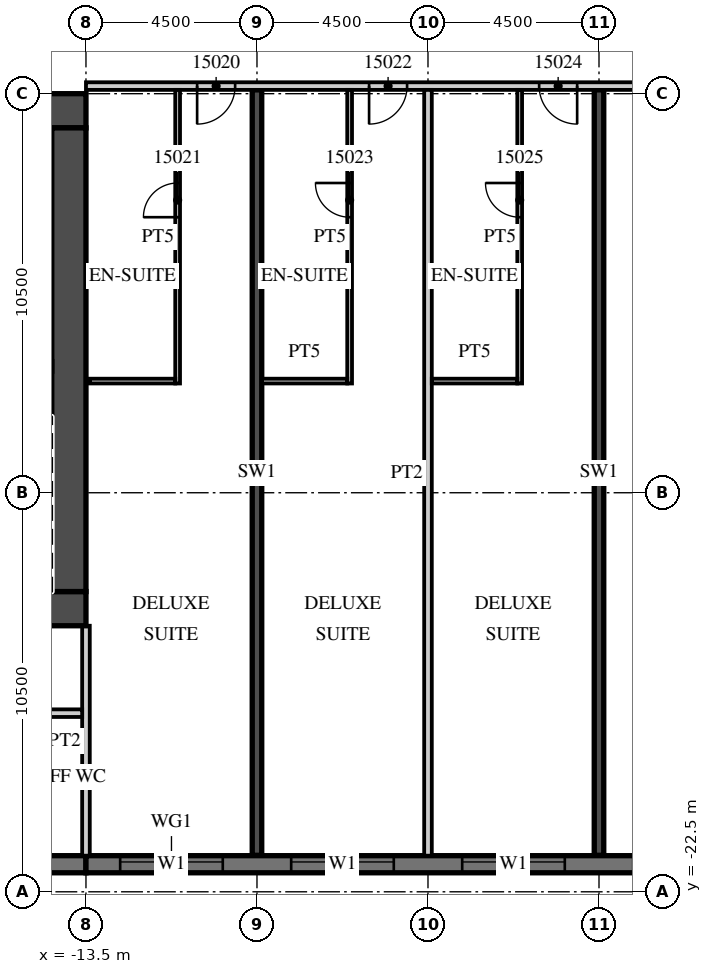
"""IFC4 building model, lengths in metres.
Left out: names, types, materials, properties, quantities, classifications, styles, units other than length and angle.
Written with IfcOpenShell. Run it as: python <this file> out.ifc"""

import sys

from ifc_helpers import new_model, si_unit, direction, frame, frame_2d, origin, place, context, subcontext, project, spatial, rectangle, extrude, element, fill, save


model = new_model("IFC4")
c1 = context("Model", 3, precision=1e-05, world=origin(), true_north=direction((0.0, 1.0)))
c2 = subcontext(c1, "Body", "Model", "MODEL_VIEW")
j1 = project(units=[si_unit("LENGTHUNIT", "METRE"), si_unit("PLANEANGLEUNIT", "RADIAN")], contexts=[c1])
p1 = place(None, origin())
s1 = spatial("IfcSite", under=j1, at=p1, CompositionType="ELEMENT")
p2 = place(p1, origin())
s2 = spatial("IfcBuilding", under=s1, at=p2, CompositionType="ELEMENT")
p3 = place(p2, frame((0.0, 0.0, 79.8)))
s3 = spatial("IfcBuildingStorey", under=s2, at=p3, CompositionType="ELEMENT", Elevation=79.8)
for number, where, z_axis, x_axis in (
    (1, (-9.0, -21.54, 0.0), (0.0, 0.0, 1.0), (0.0, 1.0, 0.0)),
    (2, (0.0, -21.54, 0.0), (0.0, 0.0, 1.0), (0.0, 1.0, 0.0)),
):
    element("IfcWall", number, at=place(p3, frame(where, z_axis=z_axis, x_axis=x_axis)), inside=s3, PredefinedType="SHEAR", context=c2, shape_type="SweptSolid", body=[
        extrude(rectangle(XDim=20.14, YDim=0.25, at=frame_2d((10.07, 0.0))), origin(), (0.0, 0.0, 1.0), 3.3),
    ])
p4 = place(p3, frame((-31.5, -21.775, 0.0), z_axis=(0.0, 0.0, 1.0), x_axis=(1.0, 0.0, 0.0)))
e3 = element("IfcWall", 3, at=p4, inside=s3, PredefinedType="SOLIDWALL", context=c2, shape_type="SweptSolid", body=[
    extrude(rectangle(XDim=18.0, YDim=0.45, at=frame_2d((9.0, 0.0))), origin(), (0.0, 0.0, 1.0), 3.02),
])
p5 = place(p3, frame((-13.5, -21.775, 0.0), z_axis=(0.0, 0.0, 1.0), x_axis=(1.0, 0.0, 0.0)))
e4 = element("IfcWall", 4, at=p5, inside=s3, PredefinedType="SOLIDWALL", context=c2, shape_type="SweptSolid", body=[
    extrude(rectangle(XDim=54.5, YDim=0.45, at=frame_2d((27.25, 0.0))), origin(), (0.0, 0.0, 1.0), 3.02),
])
p6 = place(p5, frame((0.9, 0.0, 0.45)))
e5 = element("IfcOpeningElement", 5, at=p6, cuts=e4, PredefinedType="OPENING", context=c2, shape_type="SweptSolid", body=[
    extrude(rectangle(XDim=2.7, YDim=2.25, at=frame_2d((1.35, 1.125))), frame((0.0, 0.235, 0.0), z_axis=(0.0, -1.0, 0.0), x_axis=(1.0, 0.0, 0.0)), (0.0, 0.0, 1.0), 0.47),
])
p7 = place(p5, frame((5.4, 0.0, 0.45)))
e6 = element("IfcOpeningElement", 6, at=p7, cuts=e4, PredefinedType="OPENING", context=c2, shape_type="SweptSolid", body=[
    extrude(rectangle(XDim=2.7, YDim=2.25, at=frame_2d((1.35, 1.125))), frame((0.0, 0.235, 0.0), z_axis=(0.0, -1.0, 0.0), x_axis=(1.0, 0.0, 0.0)), (0.0, 0.0, 1.0), 0.47),
])
p8 = place(p5, frame((9.9, 0.0, 0.45)))
e7 = element("IfcOpeningElement", 7, at=p8, cuts=e4, PredefinedType="OPENING", context=c2, shape_type="SweptSolid", body=[
    extrude(rectangle(XDim=2.7, YDim=2.25, at=frame_2d((1.35, 1.125))), frame((0.0, 0.235, 0.0), z_axis=(0.0, -1.0, 0.0), x_axis=(1.0, 0.0, 0.0)), (0.0, 0.0, 1.0), 0.47),
])
p9 = place(p5, frame((14.4, 0.0, 0.45)))
e8 = element("IfcOpeningElement", 8, at=p9, cuts=e4, PredefinedType="OPENING", context=c2, shape_type="SweptSolid", body=[
    extrude(rectangle(XDim=2.7, YDim=2.25, at=frame_2d((1.35, 1.125))), frame((0.0, 0.235, 0.0), z_axis=(0.0, -1.0, 0.0), x_axis=(1.0, 0.0, 0.0)), (0.0, 0.0, 1.0), 0.47),
])
p10 = place(p5, frame((18.9, 0.0, 0.45)))
e9 = element("IfcOpeningElement", 9, at=p10, cuts=e4, PredefinedType="OPENING", context=c2, shape_type="SweptSolid", body=[
    extrude(rectangle(XDim=2.7, YDim=2.25, at=frame_2d((1.35, 1.125))), frame((0.0, 0.235, 0.0), z_axis=(0.0, -1.0, 0.0), x_axis=(1.0, 0.0, 0.0)), (0.0, 0.0, 1.0), 0.47),
])
p11 = place(p5, frame((23.4, 0.0, 0.45)))
e10 = element("IfcOpeningElement", 10, at=p11, cuts=e4, PredefinedType="OPENING", context=c2, shape_type="SweptSolid", body=[
    extrude(rectangle(XDim=2.7, YDim=2.25, at=frame_2d((1.35, 1.125))), frame((0.0, 0.235, 0.0), z_axis=(0.0, -1.0, 0.0), x_axis=(1.0, 0.0, 0.0)), (0.0, 0.0, 1.0), 0.47),
])
p12 = place(p5, frame((27.9, 0.0, 0.45)))
e11 = element("IfcOpeningElement", 11, at=p12, cuts=e4, PredefinedType="OPENING", context=c2, shape_type="SweptSolid", body=[
    extrude(rectangle(XDim=2.7, YDim=2.25, at=frame_2d((1.35, 1.125))), frame((0.0, 0.235, 0.0), z_axis=(0.0, -1.0, 0.0), x_axis=(1.0, 0.0, 0.0)), (0.0, 0.0, 1.0), 0.47),
])
p13 = place(p5, frame((32.4, 0.0, 0.45)))
e12 = element("IfcOpeningElement", 12, at=p13, cuts=e4, PredefinedType="OPENING", context=c2, shape_type="SweptSolid", body=[
    extrude(rectangle(XDim=2.7, YDim=2.25, at=frame_2d((1.35, 1.125))), frame((0.0, 0.235, 0.0), z_axis=(0.0, -1.0, 0.0), x_axis=(1.0, 0.0, 0.0)), (0.0, 0.0, 1.0), 0.47),
])
p14 = place(p5, frame((36.9, 0.0, 0.45)))
e13 = element("IfcOpeningElement", 13, at=p14, cuts=e4, PredefinedType="OPENING", context=c2, shape_type="SweptSolid", body=[
    extrude(rectangle(XDim=2.7, YDim=2.25, at=frame_2d((1.35, 1.125))), frame((0.0, 0.235, 0.0), z_axis=(0.0, -1.0, 0.0), x_axis=(1.0, 0.0, 0.0)), (0.0, 0.0, 1.0), 0.47),
])
p15 = place(p5, frame((41.4, 0.0, 0.45)))
e14 = element("IfcOpeningElement", 14, at=p15, cuts=e4, PredefinedType="OPENING", context=c2, shape_type="SweptSolid", body=[
    extrude(rectangle(XDim=2.7, YDim=2.25, at=frame_2d((1.35, 1.125))), frame((0.0, 0.235, 0.0), z_axis=(0.0, -1.0, 0.0), x_axis=(1.0, 0.0, 0.0)), (0.0, 0.0, 1.0), 0.47),
])
p16 = place(p5, frame((45.9, 0.0, 0.45)))
e15 = element("IfcOpeningElement", 15, at=p16, cuts=e4, PredefinedType="OPENING", context=c2, shape_type="SweptSolid", body=[
    extrude(rectangle(XDim=2.7, YDim=2.25, at=frame_2d((1.35, 1.125))), frame((0.0, 0.235, 0.0), z_axis=(0.0, -1.0, 0.0), x_axis=(1.0, 0.0, 0.0)), (0.0, 0.0, 1.0), 0.47),
])
p17 = place(p5, frame((50.4, 0.0, 0.45)))
e16 = element("IfcOpeningElement", 16, at=p17, cuts=e4, PredefinedType="OPENING", context=c2, shape_type="SweptSolid", body=[
    extrude(rectangle(XDim=2.7, YDim=2.25, at=frame_2d((1.35, 1.125))), frame((0.0, 0.235, 0.0), z_axis=(0.0, -1.0, 0.0), x_axis=(1.0, 0.0, 0.0)), (0.0, 0.0, 1.0), 0.47),
])
p18 = place(p3, frame((-13.5, -21.55, 0.0), z_axis=(0.0, 0.0, 1.0), x_axis=(0.0, 1.0, 0.0)))
e17 = element("IfcWall", 17, at=p18, inside=s3, PredefinedType="PARTITIONING", context=c2, shape_type="SweptSolid", body=[
    extrude(rectangle(XDim=6.05, YDim=0.2, at=frame_2d((3.025, 0.0))), origin(), (0.0, 0.0, 1.0), 3.02),
])
p19 = place(p3, frame((-13.5, -1.3, 0.0), z_axis=(0.0, 0.0, 1.0), x_axis=(1.0, 0.0, 0.0)))
e18 = element("IfcWall", 18, at=p19, inside=s3, PredefinedType="PARTITIONING", context=c2, shape_type="SweptSolid", body=[
    extrude(rectangle(XDim=58.05, YDim=0.2, at=frame_2d((29.025, 0.0))), origin(), (0.0, 0.0, 1.0), 3.02),
])
p20 = place(p19, frame((2.925, 0.0, 0.0)))
e19 = element("IfcOpeningElement", 19, at=p20, cuts=e18, PredefinedType="OPENING", context=c2, shape_type="SweptSolid", body=[
    extrude(rectangle(XDim=1.0, YDim=2.1, at=frame_2d((0.5, 1.05))), frame((0.0, 0.11, 0.0), z_axis=(0.0, -1.0, 0.0), x_axis=(1.0, 0.0, 0.0)), (0.0, 0.0, 1.0), 0.22),
])
p21 = place(p19, frame((7.45, 0.0, 0.0)))
e20 = element("IfcOpeningElement", 20, at=p21, cuts=e18, PredefinedType="OPENING", context=c2, shape_type="SweptSolid", body=[
    extrude(rectangle(XDim=1.0, YDim=2.1, at=frame_2d((0.5, 1.05))), frame((0.0, 0.11, 0.0), z_axis=(0.0, -1.0, 0.0), x_axis=(1.0, 0.0, 0.0)), (0.0, 0.0, 1.0), 0.22),
])
p22 = place(p19, frame((11.925, 0.0, 0.0)))
e21 = element("IfcOpeningElement", 21, at=p22, cuts=e18, PredefinedType="OPENING", context=c2, shape_type="SweptSolid", body=[
    extrude(rectangle(XDim=1.0, YDim=2.1, at=frame_2d((0.5, 1.05))), frame((0.0, 0.11, 0.0), z_axis=(0.0, -1.0, 0.0), x_axis=(1.0, 0.0, 0.0)), (0.0, 0.0, 1.0), 0.22),
])
p23 = place(p19, frame((15.938, 0.0, 0.0)))
e22 = element("IfcOpeningElement", 22, at=p23, cuts=e18, PredefinedType="OPENING", context=c2, shape_type="SweptSolid", body=[
    extrude(rectangle(XDim=1.2, YDim=2.1, at=frame_2d((0.6, 1.05))), frame((0.0, 0.11, 0.0), z_axis=(0.0, -1.0, 0.0), x_axis=(1.0, 0.0, 0.0)), (0.0, 0.0, 1.0), 0.22),
])
p24 = place(p19, frame((25.45, 0.0, 0.0)))
e23 = element("IfcOpeningElement", 23, at=p24, cuts=e18, PredefinedType="OPENING", context=c2, shape_type="SweptSolid", body=[
    extrude(rectangle(XDim=1.0, YDim=2.1, at=frame_2d((0.5, 1.05))), frame((0.0, 0.11, 0.0), z_axis=(0.0, -1.0, 0.0), x_axis=(1.0, 0.0, 0.0)), (0.0, 0.0, 1.0), 0.22),
])
p25 = place(p19, frame((29.925, 0.0, 0.0)))
e24 = element("IfcOpeningElement", 24, at=p25, cuts=e18, PredefinedType="OPENING", context=c2, shape_type="SweptSolid", body=[
    extrude(rectangle(XDim=1.0, YDim=2.1, at=frame_2d((0.5, 1.05))), frame((0.0, 0.11, 0.0), z_axis=(0.0, -1.0, 0.0), x_axis=(1.0, 0.0, 0.0)), (0.0, 0.0, 1.0), 0.22),
])
p26 = place(p19, frame((36.862, 0.0, 0.0)))
e25 = element("IfcOpeningElement", 25, at=p26, cuts=e18, PredefinedType="OPENING", context=c2, shape_type="SweptSolid", body=[
    extrude(rectangle(XDim=1.2, YDim=2.1, at=frame_2d((0.6, 1.05))), frame((0.0, 0.11, 0.0), z_axis=(0.0, -1.0, 0.0), x_axis=(1.0, 0.0, 0.0)), (0.0, 0.0, 1.0), 0.22),
])
p27 = place(p19, frame((41.075, 0.0, 0.0)))
e26 = element("IfcOpeningElement", 26, at=p27, cuts=e18, PredefinedType="OPENING", context=c2, shape_type="SweptSolid", body=[
    extrude(rectangle(XDim=1.0, YDim=2.1, at=frame_2d((0.5, 1.05))), frame((0.0, 0.11, 0.0), z_axis=(0.0, -1.0, 0.0), x_axis=(1.0, 0.0, 0.0)), (0.0, 0.0, 1.0), 0.22),
])
p28 = place(p19, frame((45.55, 0.0, 0.0)))
e27 = element("IfcOpeningElement", 27, at=p28, cuts=e18, PredefinedType="OPENING", context=c2, shape_type="SweptSolid", body=[
    extrude(rectangle(XDim=1.0, YDim=2.1, at=frame_2d((0.5, 1.05))), frame((0.0, 0.11, 0.0), z_axis=(0.0, -1.0, 0.0), x_axis=(1.0, 0.0, 0.0)), (0.0, 0.0, 1.0), 0.22),
])
p29 = place(p19, frame((52.425, 0.0, 0.0)))
e28 = element("IfcOpeningElement", 28, at=p29, cuts=e18, PredefinedType="OPENING", context=c2, shape_type="SweptSolid", body=[
    extrude(rectangle(XDim=1.0, YDim=2.1, at=frame_2d((0.5, 1.05))), frame((0.0, 0.11, 0.0), z_axis=(0.0, -1.0, 0.0), x_axis=(1.0, 0.0, 0.0)), (0.0, 0.0, 1.0), 0.22),
])
p30 = place(p19, frame((56.525, 0.0, 0.0)))
e29 = element("IfcOpeningElement", 29, at=p30, cuts=e18, PredefinedType="OPENING", context=c2, shape_type="SweptSolid", body=[
    extrude(rectangle(XDim=1.0, YDim=2.1, at=frame_2d((0.5, 1.05))), frame((0.0, 0.11, 0.0), z_axis=(0.0, -1.0, 0.0), x_axis=(1.0, 0.0, 0.0)), (0.0, 0.0, 1.0), 0.22),
])
p31 = place(p3, frame((-11.088, -9.125, 0.0), z_axis=(0.0, 0.0, 1.0), x_axis=(0.0, 1.0, 0.0)))
e30 = element("IfcWall", 30, at=p31, inside=s3, PredefinedType="PARTITIONING", context=c2, shape_type="SweptSolid", body=[
    extrude(rectangle(XDim=7.725, YDim=0.125, at=frame_2d((3.863, 0.0))), origin(), (0.0, 0.0, 1.0), 3.02),
])
p32 = place(p31, frame((4.375, 0.0, 0.0)))
e31 = element("IfcOpeningElement", 31, at=p32, cuts=e30, PredefinedType="OPENING", context=c2, shape_type="SweptSolid", body=[
    extrude(rectangle(XDim=0.9, YDim=2.1, at=frame_2d((0.45, 1.05))), frame((0.0, 0.073, 0.0), z_axis=(0.0, -1.0, 0.0), x_axis=(1.0, 0.0, 0.0)), (0.0, 0.0, 1.0), 0.145),
])
p33 = place(p3, frame((-13.4, -9.062, 0.0), z_axis=(0.0, 0.0, 1.0), x_axis=(1.0, 0.0, 0.0)))
e32 = element("IfcWall", 32, at=p33, inside=s3, PredefinedType="PARTITIONING", context=c2, shape_type="SweptSolid", body=[
    extrude(rectangle(XDim=2.25, YDim=0.125, at=frame_2d((1.125, 0.0))), origin(), (0.0, 0.0, 1.0), 3.02),
])
p34 = place(p3, frame((-4.5, -21.55, 0.0), z_axis=(0.0, 0.0, 1.0), x_axis=(0.0, 1.0, 0.0)))
e33 = element("IfcWall", 33, at=p34, inside=s3, PredefinedType="PARTITIONING", context=c2, shape_type="SweptSolid", body=[
    extrude(rectangle(XDim=20.15, YDim=0.2, at=frame_2d((10.075, 0.0))), origin(), (0.0, 0.0, 1.0), 3.02),
])
p35 = place(p3, frame((-6.562, -9.125, 0.0), z_axis=(0.0, 0.0, 1.0), x_axis=(0.0, 1.0, 0.0)))
e34 = element("IfcWall", 34, at=p35, inside=s3, PredefinedType="PARTITIONING", context=c2, shape_type="SweptSolid", body=[
    extrude(rectangle(XDim=7.725, YDim=0.125, at=frame_2d((3.863, 0.0))), origin(), (0.0, 0.0, 1.0), 3.02),
])
p36 = place(p35, frame((4.375, 0.0, 0.0)))
e35 = element("IfcOpeningElement", 35, at=p36, cuts=e34, PredefinedType="OPENING", context=c2, shape_type="SweptSolid", body=[
    extrude(rectangle(XDim=0.9, YDim=2.1, at=frame_2d((0.45, 1.05))), frame((0.0, 0.073, 0.0), z_axis=(0.0, -1.0, 0.0), x_axis=(1.0, 0.0, 0.0)), (0.0, 0.0, 1.0), 0.145),
])
p37 = place(p3, frame((-8.875, -9.062, 0.0), z_axis=(0.0, 0.0, 1.0), x_axis=(1.0, 0.0, 0.0)))
e36 = element("IfcWall", 36, at=p37, inside=s3, PredefinedType="PARTITIONING", context=c2, shape_type="SweptSolid", body=[
    extrude(rectangle(XDim=2.25, YDim=0.125, at=frame_2d((1.125, 0.0))), origin(), (0.0, 0.0, 1.0), 3.02),
])
p38 = place(p3, frame((-2.087, -9.125, 0.0), z_axis=(0.0, 0.0, 1.0), x_axis=(0.0, 1.0, 0.0)))
e37 = element("IfcWall", 37, at=p38, inside=s3, PredefinedType="PARTITIONING", context=c2, shape_type="SweptSolid", body=[
    extrude(rectangle(XDim=7.725, YDim=0.125, at=frame_2d((3.863, 0.0))), origin(), (0.0, 0.0, 1.0), 3.02),
])
p39 = place(p38, frame((4.375, 0.0, 0.0)))
e38 = element("IfcOpeningElement", 38, at=p39, cuts=e37, PredefinedType="OPENING", context=c2, shape_type="SweptSolid", body=[
    extrude(rectangle(XDim=0.9, YDim=2.1, at=frame_2d((0.45, 1.05))), frame((0.0, 0.073, 0.0), z_axis=(0.0, -1.0, 0.0), x_axis=(1.0, 0.0, 0.0)), (0.0, 0.0, 1.0), 0.145),
])
p40 = place(p3, frame((-4.4, -9.062, 0.0), z_axis=(0.0, 0.0, 1.0), x_axis=(1.0, 0.0, 0.0)))
e39 = element("IfcWall", 39, at=p40, inside=s3, PredefinedType="PARTITIONING", context=c2, shape_type="SweptSolid", body=[
    extrude(rectangle(XDim=2.25, YDim=0.125, at=frame_2d((1.125, 0.0))), origin(), (0.0, 0.0, 1.0), 3.02),
])
p41 = place(p3, frame((-31.5, -1.95, 0.0), z_axis=(0.0, 0.0, 1.0), x_axis=(1.0, 0.0, 0.0)))
e40 = element("IfcWall", 40, at=p41, inside=s3, PredefinedType="SHEAR", context=c2, shape_type="SweptSolid", body=[
    extrude(rectangle(XDim=18.0, YDim=0.9, at=frame_2d((9.0, 0.0))), origin(), (0.0, 0.0, 1.0), 3.02),
])
p42 = place(p41, frame((14.725, 0.0, 0.0)))
e41 = element("IfcOpeningElement", 41, at=p42, cuts=e40, PredefinedType="OPENING", context=c2, shape_type="SweptSolid", body=[
    extrude(rectangle(XDim=1.8, YDim=2.1, at=frame_2d((0.9, 1.05))), frame((0.0, 0.46, 0.0), z_axis=(0.0, -1.0, 0.0), x_axis=(1.0, 0.0, 0.0)), (0.0, 0.0, 1.0), 0.92),
])
p43 = place(p3, frame((-20.3, -15.05, 0.0), z_axis=(0.0, 0.0, 1.0), x_axis=(1.0, 0.0, 0.0)))
e42 = element("IfcWall", 42, at=p43, inside=s3, PredefinedType="SHEAR", context=c2, shape_type="SweptSolid", body=[
    extrude(rectangle(XDim=6.8, YDim=0.9, at=frame_2d((3.4, 0.0))), origin(), (0.0, 0.0, 1.0), 3.02),
])
p44 = place(p43, frame((0.875, 0.0, 0.0)))
e43 = element("IfcOpeningElement", 43, at=p44, cuts=e42, PredefinedType="OPENING", context=c2, shape_type="SweptSolid", body=[
    extrude(rectangle(XDim=1.2, YDim=2.1, at=frame_2d((0.6, 1.05))), frame((0.0, 0.46, 0.0), z_axis=(0.0, -1.0, 0.0), x_axis=(1.0, 0.0, 0.0)), (0.0, 0.0, 1.0), 0.92),
])
p45 = place(p3, frame((-13.95, -14.6, 0.0), z_axis=(0.0, 0.0, 1.0), x_axis=(0.0, 1.0, 0.0)))
e44 = element("IfcWall", 44, at=p45, inside=s3, PredefinedType="SHEAR", context=c2, shape_type="SweptSolid", body=[
    extrude(rectangle(XDim=12.2, YDim=0.9, at=frame_2d((6.1, 0.0))), origin(), (0.0, 0.0, 1.0), 3.02),
])
p46 = place(p3, frame((-44.55, -17.8, 0.0), z_axis=(0.0, 0.0, 1.0), x_axis=(1.0, 0.0, 0.0)))
e45 = element("IfcWall", 45, at=p46, inside=s3, PredefinedType="PARTITIONING", context=c2, shape_type="SweptSolid", body=[
    extrude(rectangle(XDim=30.95, YDim=0.2, at=frame_2d((15.475, 0.0))), origin(), (0.0, 0.0, 1.0), 3.02),
])
p47 = place(p46, frame((15.038, 0.0, 0.0)))
e46 = element("IfcOpeningElement", 46, at=p47, cuts=e45, PredefinedType="OPENING", context=c2, shape_type="SweptSolid", body=[
    extrude(rectangle(XDim=0.9, YDim=2.1, at=frame_2d((0.45, 1.05))), frame((0.0, 0.11, 0.0), z_axis=(0.0, -1.0, 0.0), x_axis=(1.0, 0.0, 0.0)), (0.0, 0.0, 1.0), 0.22),
])
p48 = place(p46, frame((23.337, 0.0, 0.0)))
e47 = element("IfcOpeningElement", 47, at=p48, cuts=e45, PredefinedType="OPENING", context=c2, shape_type="SweptSolid", body=[
    extrude(rectangle(XDim=0.9, YDim=2.1, at=frame_2d((0.45, 1.05))), frame((0.0, 0.11, 0.0), z_axis=(0.0, -1.0, 0.0), x_axis=(1.0, 0.0, 0.0)), (0.0, 0.0, 1.0), 0.22),
])
p49 = place(p6, origin())
e48 = element("IfcWindow", 48, at=p49, inside=s3, PartitioningType="SINGLE_PANEL", PredefinedType="WINDOW", context=c2, shape_type="SweptSolid", body=[
    extrude(rectangle(XDim=2.7, YDim=2.25, at=frame_2d((1.35, 1.125))), frame((0.0, 0.09, 0.0), z_axis=(0.0, -1.0, 0.0), x_axis=(1.0, 0.0, 0.0)), (0.0, 0.0, 1.0), 0.06),
])
fill(e5, e48)
p50 = place(p7, origin())
e49 = element("IfcWindow", 49, at=p50, inside=s3, PartitioningType="SINGLE_PANEL", PredefinedType="WINDOW", context=c2, shape_type="SweptSolid", body=[
    extrude(rectangle(XDim=2.7, YDim=2.25, at=frame_2d((1.35, 1.125))), frame((0.0, 0.09, 0.0), z_axis=(0.0, -1.0, 0.0), x_axis=(1.0, 0.0, 0.0)), (0.0, 0.0, 1.0), 0.06),
])
fill(e6, e49)
p51 = place(p8, origin())
e50 = element("IfcWindow", 50, at=p51, inside=s3, PartitioningType="SINGLE_PANEL", PredefinedType="WINDOW", context=c2, shape_type="SweptSolid", body=[
    extrude(rectangle(XDim=2.7, YDim=2.25, at=frame_2d((1.35, 1.125))), frame((0.0, 0.09, 0.0), z_axis=(0.0, -1.0, 0.0), x_axis=(1.0, 0.0, 0.0)), (0.0, 0.0, 1.0), 0.06),
])
fill(e7, e50)
p52 = place(p20, origin())
e51 = element("IfcDoor", 51, at=p52, inside=s3, OperationType="SINGLE_SWING_LEFT", PredefinedType="DOOR", context=c2, shape_type="SweptSolid", body=[
    extrude(rectangle(XDim=1.0, YDim=2.1, at=frame_2d((0.5, 1.05))), frame((0.0, 0.025, 0.0), z_axis=(0.0, -1.0, 0.0), x_axis=(1.0, 0.0, 0.0)), (0.0, 0.0, 1.0), 0.05),
])
fill(e19, e51)
p53 = place(p32, origin())
e52 = element("IfcDoor", 52, at=p53, inside=s3, OperationType="SINGLE_SWING_LEFT", PredefinedType="DOOR", context=c2, shape_type="SweptSolid", body=[
    extrude(rectangle(XDim=0.9, YDim=2.1, at=frame_2d((0.45, 1.05))), frame((0.0, 0.025, 0.0), z_axis=(0.0, -1.0, 0.0), x_axis=(1.0, 0.0, 0.0)), (0.0, 0.0, 1.0), 0.05),
])
fill(e31, e52)
p54 = place(p21, origin())
e53 = element("IfcDoor", 53, at=p54, inside=s3, OperationType="SINGLE_SWING_LEFT", PredefinedType="DOOR", context=c2, shape_type="SweptSolid", body=[
    extrude(rectangle(XDim=1.0, YDim=2.1, at=frame_2d((0.5, 1.05))), frame((0.0, 0.025, 0.0), z_axis=(0.0, -1.0, 0.0), x_axis=(1.0, 0.0, 0.0)), (0.0, 0.0, 1.0), 0.05),
])
fill(e20, e53)
p55 = place(p36, origin())
e54 = element("IfcDoor", 54, at=p55, inside=s3, OperationType="SINGLE_SWING_RIGHT", PredefinedType="DOOR", context=c2, shape_type="SweptSolid", body=[
    extrude(rectangle(XDim=0.9, YDim=2.1, at=frame_2d((0.45, 1.05))), frame((0.0, 0.025, 0.0), z_axis=(0.0, -1.0, 0.0), x_axis=(1.0, 0.0, 0.0)), (0.0, 0.0, 1.0), 0.05),
])
fill(e35, e54)
p56 = place(p22, origin())
e55 = element("IfcDoor", 55, at=p56, inside=s3, OperationType="SINGLE_SWING_RIGHT", PredefinedType="DOOR", context=c2, shape_type="SweptSolid", body=[
    extrude(rectangle(XDim=1.0, YDim=2.1, at=frame_2d((0.5, 1.05))), frame((0.0, 0.025, 0.0), z_axis=(0.0, -1.0, 0.0), x_axis=(1.0, 0.0, 0.0)), (0.0, 0.0, 1.0), 0.05),
])
fill(e21, e55)
p57 = place(p39, origin())
e56 = element("IfcDoor", 56, at=p57, inside=s3, OperationType="SINGLE_SWING_RIGHT", PredefinedType="DOOR", context=c2, shape_type="SweptSolid", body=[
    extrude(rectangle(XDim=0.9, YDim=2.1, at=frame_2d((0.45, 1.05))), frame((0.0, 0.025, 0.0), z_axis=(0.0, -1.0, 0.0), x_axis=(1.0, 0.0, 0.0)), (0.0, 0.0, 1.0), 0.05),
])
fill(e38, e56)
save(model, sys.argv[1])
